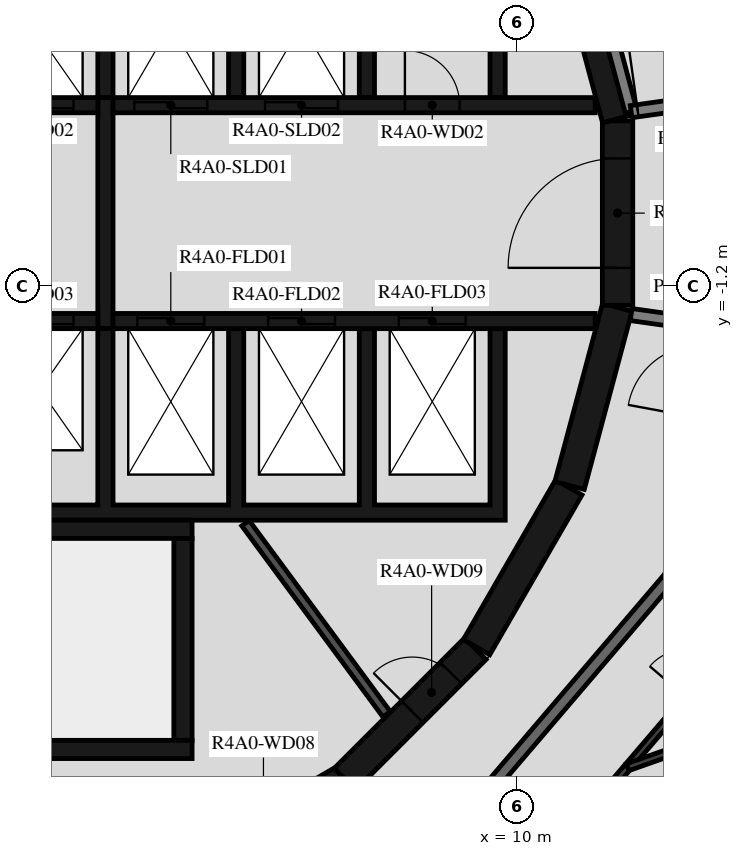
"""IFC4 building model, lengths in metres.
Left out: names, types, materials, properties, quantities, classifications, styles, units other than length and angle.
Written with IfcOpenShell. Run it as: python <this file> out.ifc"""

import sys

from ifc_helpers import new_model, si_unit, direction, frame, frame_2d, origin, place, context, subcontext, project, spatial, polyline, rectangle, outline, extrude, element, fill, save


model = new_model("IFC4")
c1 = context("Model", 3, precision=1e-05, world=origin(), true_north=direction((0.0, 1.0)))
c2 = subcontext(c1, "Body", "Model", "MODEL_VIEW")
j1 = project(units=[si_unit("LENGTHUNIT", "METRE"), si_unit("PLANEANGLEUNIT", "RADIAN")], contexts=[c1])
p1 = place(None, origin())
s1 = spatial("IfcSite", under=j1, at=p1, CompositionType="ELEMENT")
p2 = place(p1, origin())
s2 = spatial("IfcBuilding", under=s1, at=p2, CompositionType="ELEMENT")
p3 = place(p2, frame((0.0, 0.0, 151.7)))
s3 = spatial("IfcBuildingStorey", under=s2, at=p3, CompositionType="ELEMENT", Elevation=151.7)
p4 = place(p3, frame((4.51, -10.845, 0.0), z_axis=(0.0, 0.0, 1.0), x_axis=(0.865975092491, 0.500087131594, 0.0)))
e1 = element("IfcWall", 1, at=p4, inside=s3, PredefinedType="SHEAR", context=c2, shape_type="SweptSolid", body=[
    extrude(rectangle(XDim=3.033, YDim=0.5, at=frame_2d((1.516, 0.0))), origin(), (0.0, 0.0, 1.0), 3.12),
])
p5 = place(p4, frame((1.066, 0.0, 0.0)))
e2 = element("IfcOpeningElement", 2, at=p5, cuts=e1, PredefinedType="OPENING", context=c2, shape_type="SweptSolid", body=[
    extrude(rectangle(XDim=0.9, YDim=2.1, at=frame_2d((0.45, 1.05))), frame((0.0, 0.26, 0.0), z_axis=(0.0, -1.0, 0.0), x_axis=(1.0, 0.0, 0.0)), (0.0, 0.0, 1.0), 0.52),
])
p6 = place(p3, frame((7.164, -9.308, 0.0), z_axis=(0.0, 0.0, 1.0), x_axis=(0.707106781187, 0.707106781187, 0.0)))
e3 = element("IfcWall", 3, at=p6, inside=s3, PredefinedType="SHEAR", context=c2, shape_type="SweptSolid", body=[
    extrude(rectangle(XDim=3.032, YDim=0.5, at=frame_2d((1.516, 0.0))), origin(), (0.0, 0.0, 1.0), 3.12),
])
p7 = place(p6, frame((1.566, 0.0, 0.0)))
e4 = element("IfcOpeningElement", 4, at=p7, cuts=e3, PredefinedType="OPENING", context=c2, shape_type="SweptSolid", body=[
    extrude(rectangle(XDim=0.9, YDim=2.1, at=frame_2d((0.45, 1.05))), frame((0.0, 0.26, 0.0), z_axis=(0.0, -1.0, 0.0), x_axis=(1.0, 0.0, 0.0)), (0.0, 0.0, 1.0), 0.52),
])
for number, where, z_axis, x_axis in (
    (5, (9.329, -7.137, 0.0), (0.0, 0.0, 1.0), (0.5, 0.866, 0.0)),
    (6, (10.858, -4.479, 0.0), (0.0, 0.0, 1.0), (0.259, 0.966, 0.0)),
):
    element("IfcWall", number, at=place(p3, frame(where, z_axis=z_axis, x_axis=x_axis)), inside=s3, PredefinedType="SHEAR", context=c2, shape_type="SweptSolid", body=[
        extrude(rectangle(XDim=3.033, YDim=0.5, at=frame_2d((1.516, 0.0))), origin(), (0.0, 0.0, 1.0), 3.12),
    ])
p8 = place(p3, frame((11.647, -1.516, 0.0), z_axis=(0.0, 0.0, 1.0), x_axis=(0.0, 1.0, 0.0)))
e7 = element("IfcWall", 7, at=p8, inside=s3, PredefinedType="SHEAR", context=c2, shape_type="SweptSolid", body=[
    extrude(rectangle(XDim=3.033, YDim=0.5, at=frame_2d((1.516, 0.0))), origin(), (0.0, 0.0, 1.0), 3.12),
])
p9 = place(p8, frame((0.616, 0.0, 0.0)))
e8 = element("IfcOpeningElement", 8, at=p9, cuts=e7, PredefinedType="OPENING", context=c2, shape_type="SweptSolid", body=[
    extrude(rectangle(XDim=1.8, YDim=2.1, at=frame_2d((0.9, 1.05))), frame((0.0, 0.26, 0.0), z_axis=(0.0, -1.0, 0.0), x_axis=(1.0, 0.0, 0.0)), (0.0, 0.0, 1.0), 0.52),
])
p10 = place(p3, frame((11.643, 1.55, 0.0), z_axis=(0.0, 0.0, 1.0), x_axis=(-0.258734743916, 0.965948410781, 0.0)))
e9 = element("IfcWall", 9, at=p10, inside=s3, PredefinedType="SHEAR", context=c2, shape_type="SweptSolid", body=[
    extrude(rectangle(XDim=3.033, YDim=0.5, at=frame_2d((1.516, 0.0))), origin(), (0.0, 0.0, 1.0), 3.12),
])
p11 = place(p3, frame((-2.4, -5.2, 0.0), z_axis=(0.0, 0.0, 1.0), x_axis=(1.0, 0.0, 0.0)))
e10 = element("IfcWall", 10, at=p11, inside=s3, PredefinedType="SHEAR", context=c2, shape_type="SweptSolid", body=[
    extrude(rectangle(XDim=7.05, YDim=0.3, at=frame_2d((3.525, 0.0))), origin(), (0.0, 0.0, 1.0), 3.12),
])
p12 = place(p3, frame((4.5, -8.67, 0.0), z_axis=(0.0, 0.0, 1.0), x_axis=(0.0, 1.0, 0.0)))
e11 = element("IfcWall", 11, at=p12, inside=s3, PredefinedType="SHEAR", context=c2, shape_type="SweptSolid", body=[
    extrude(rectangle(XDim=3.32, YDim=0.3, at=frame_2d((1.66, 0.0))), origin(), (0.0, 0.0, 1.0), 3.12),
])
p13 = place(p3, frame((0.1, -8.82, 0.0), z_axis=(0.0, 0.0, 1.0), x_axis=(1.0, 0.0, 0.0)))
e12 = element("IfcWall", 12, at=p13, inside=s3, PredefinedType="SHEAR", context=c2, shape_type="SweptSolid", body=[
    extrude(rectangle(XDim=4.55, YDim=0.3, at=frame_2d((2.275, 0.0))), origin(), (0.0, 0.0, 1.0), 3.12),
])
p14 = place(p3, origin())
e13 = element("IfcWall", 13, at=p14, inside=s3, PredefinedType="SHEAR", context=c2, shape_type="SweptSolid", body=[
    extrude(outline(polyline([(-9.55, 4.8), (-1.2, 4.8), (-1.2, 1.9), (-0.95, 1.9), (-0.95, 4.8), (0.95, 4.8), (0.95, 1.9), (1.2, 1.9), (1.2, 4.8), (3.1, 4.8), (3.1, 1.9), (3.35, 1.9), (3.35, 4.8), (5.25, 4.8), (5.25, 1.9), (5.5, 1.9), (5.5, 4.8), (7.4, 4.8), (7.4, 1.9), (7.65, 1.9), (7.65, 4.8), (9.55, 4.8), (9.55, 1.9), (9.8, 1.9), (9.8, 4.8), (9.8, 5.05), (-9.8, 5.05), (-9.8, 4.8), (-9.8, 1.9), (-9.55, 1.9), (-9.55, 4.8)])), origin(), (0.0, 0.0, 1.0), 3.12),
])
p15 = place(p3, origin())
e14 = element("IfcWall", 14, at=p15, inside=s3, PredefinedType="SHEAR", context=c2, shape_type="SweptSolid", body=[
    extrude(outline(polyline([(9.8, -5.05), (9.8, -4.8), (9.8, -1.9), (9.55, -1.9), (9.55, -4.8), (7.65, -4.8), (7.65, -1.9), (7.4, -1.9), (7.4, -4.8), (5.5, -4.8), (5.5, -1.9), (5.25, -1.9), (5.25, -4.8), (3.35, -4.8), (3.35, -1.9), (3.1, -1.9), (3.1, -4.8), (1.2, -4.8), (1.2, -1.9), (0.95, -1.9), (0.95, -4.8), (-0.95, -4.8), (-0.95, -1.9), (-1.2, -1.9), (-1.2, -4.8), (-3.1, -4.8), (-3.1, -1.9), (-3.35, -1.9), (-3.35, -4.8), (-5.25, -4.8), (-5.25, -1.9), (-5.5, -1.9), (-5.5, -4.8), (-7.4, -4.8), (-7.4, -1.9), (-7.65, -1.9), (-7.65, -4.8), (-9.55, -4.8), (-9.55, -1.9), (-9.8, -1.9), (-9.8, -4.8), (-9.8, -5.05), (9.8, -5.05)])), origin(), (0.0, 0.0, 1.0), 3.12),
])
p16 = place(p3, frame((-11.28, 1.775, 0.0), z_axis=(0.0, 0.0, 1.0), x_axis=(1.0, 0.0, 0.0)))
e15 = element("IfcWall", 15, at=p16, inside=s3, PredefinedType="SHEAR", context=c2, shape_type="SweptSolid", body=[
    extrude(rectangle(XDim=14.38, YDim=0.25, at=frame_2d((7.19, 0.0))), origin(), (0.0, 0.0, 1.0), 3.12),
])
p17 = place(p16, frame((10.73, 0.0, 0.0)))
e16 = element("IfcOpeningElement", 16, at=p17, cuts=e15, PredefinedType="OPENING", context=c2, shape_type="SweptSolid", body=[
    extrude(rectangle(XDim=1.1, YDim=2.1, at=frame_2d((0.55, 1.05))), frame((0.0, 0.135, 0.0), z_axis=(0.0, -1.0, 0.0), x_axis=(1.0, 0.0, 0.0)), (0.0, 0.0, 1.0), 0.27),
])
p18 = place(p16, frame((12.88, 0.0, 0.0)))
e17 = element("IfcOpeningElement", 17, at=p18, cuts=e15, PredefinedType="OPENING", context=c2, shape_type="SweptSolid", body=[
    extrude(rectangle(XDim=1.1, YDim=2.1, at=frame_2d((0.55, 1.05))), frame((0.0, 0.135, 0.0), z_axis=(0.0, -1.0, 0.0), x_axis=(1.0, 0.0, 0.0)), (0.0, 0.0, 1.0), 0.27),
])
p19 = place(p16, frame((5.455, 0.0, 0.0)))
e18 = element("IfcOpeningElement", 18, at=p19, cuts=e15, PredefinedType="OPENING", context=c2, shape_type="SweptSolid", body=[
    extrude(rectangle(XDim=0.9, YDim=2.1, at=frame_2d((0.45, 1.05))), frame((0.0, 0.135, 0.0), z_axis=(0.0, -1.0, 0.0), x_axis=(1.0, 0.0, 0.0)), (0.0, 0.0, 1.0), 0.27),
])
p20 = place(p3, frame((3.35, 1.775, 0.0), z_axis=(0.0, 0.0, 1.0), x_axis=(1.0, 0.0, 0.0)))
e19 = element("IfcWall", 19, at=p20, inside=s3, PredefinedType="SHEAR", context=c2, shape_type="SweptSolid", body=[
    extrude(rectangle(XDim=7.93, YDim=0.25, at=frame_2d((3.965, 0.0))), origin(), (0.0, 0.0, 1.0), 3.12),
])
p21 = place(p20, frame((0.35, 0.0, 0.0)))
e20 = element("IfcOpeningElement", 20, at=p21, cuts=e19, PredefinedType="OPENING", context=c2, shape_type="SweptSolid", body=[
    extrude(rectangle(XDim=1.2, YDim=2.4, at=frame_2d((0.6, 1.2))), frame((0.0, 0.135, 0.0), z_axis=(0.0, -1.0, 0.0), x_axis=(1.0, 0.0, 0.0)), (0.0, 0.0, 1.0), 0.27),
])
p22 = place(p20, frame((2.5, 0.0, 0.0)))
e21 = element("IfcOpeningElement", 21, at=p22, cuts=e19, PredefinedType="OPENING", context=c2, shape_type="SweptSolid", body=[
    extrude(rectangle(XDim=1.2, YDim=2.4, at=frame_2d((0.6, 1.2))), frame((0.0, 0.135, 0.0), z_axis=(0.0, -1.0, 0.0), x_axis=(1.0, 0.0, 0.0)), (0.0, 0.0, 1.0), 0.27),
])
p23 = place(p20, frame((4.8, 0.0, 0.0)))
e22 = element("IfcOpeningElement", 22, at=p23, cuts=e19, PredefinedType="OPENING", context=c2, shape_type="SweptSolid", body=[
    extrude(rectangle(XDim=0.9, YDim=2.1, at=frame_2d((0.45, 1.05))), frame((0.0, 0.135, 0.0), z_axis=(0.0, -1.0, 0.0), x_axis=(1.0, 0.0, 0.0)), (0.0, 0.0, 1.0), 0.27),
])
p24 = place(p3, frame((-11.28, -1.775, 0.0), z_axis=(0.0, 0.0, 1.0), x_axis=(1.0, 0.0, 0.0)))
e23 = element("IfcWall", 23, at=p24, inside=s3, PredefinedType="SHEAR", context=c2, shape_type="SweptSolid", body=[
    extrude(rectangle(XDim=14.38, YDim=0.25, at=frame_2d((7.19, 0.0))), origin(), (0.0, 0.0, 1.0), 3.12),
])
p25 = place(p24, frame((2.03, 0.0, 0.0)))
e24 = element("IfcOpeningElement", 24, at=p25, cuts=e23, PredefinedType="OPENING", context=c2, shape_type="SweptSolid", body=[
    extrude(rectangle(XDim=1.3, YDim=2.1, at=frame_2d((0.65, 1.05))), frame((0.0, 0.135, 0.0), z_axis=(0.0, -1.0, 0.0), x_axis=(1.0, 0.0, 0.0)), (0.0, 0.0, 1.0), 0.27),
])
p26 = place(p24, frame((4.18, 0.0, 0.0)))
e25 = element("IfcOpeningElement", 25, at=p26, cuts=e23, PredefinedType="OPENING", context=c2, shape_type="SweptSolid", body=[
    extrude(rectangle(XDim=1.3, YDim=2.1, at=frame_2d((0.65, 1.05))), frame((0.0, 0.135, 0.0), z_axis=(0.0, -1.0, 0.0), x_axis=(1.0, 0.0, 0.0)), (0.0, 0.0, 1.0), 0.27),
])
p27 = place(p24, frame((12.88, 0.0, 0.0)))
e26 = element("IfcOpeningElement", 26, at=p27, cuts=e23, PredefinedType="OPENING", context=c2, shape_type="SweptSolid", body=[
    extrude(rectangle(XDim=1.1, YDim=2.1, at=frame_2d((0.55, 1.05))), frame((0.0, 0.135, 0.0), z_axis=(0.0, -1.0, 0.0), x_axis=(1.0, 0.0, 0.0)), (0.0, 0.0, 1.0), 0.27),
])
p28 = place(p24, frame((6.53, 0.0, 0.0)))
e27 = element("IfcOpeningElement", 27, at=p28, cuts=e23, PredefinedType="OPENING", context=c2, shape_type="SweptSolid", body=[
    extrude(rectangle(XDim=0.9, YDim=2.1, at=frame_2d((0.45, 1.05))), frame((0.0, 0.135, 0.0), z_axis=(0.0, -1.0, 0.0), x_axis=(1.0, 0.0, 0.0)), (0.0, 0.0, 1.0), 0.27),
])
p29 = place(p24, frame((8.68, 0.0, 0.0)))
e28 = element("IfcOpeningElement", 28, at=p29, cuts=e23, PredefinedType="OPENING", context=c2, shape_type="SweptSolid", body=[
    extrude(rectangle(XDim=0.9, YDim=2.1, at=frame_2d((0.45, 1.05))), frame((0.0, 0.135, 0.0), z_axis=(0.0, -1.0, 0.0), x_axis=(1.0, 0.0, 0.0)), (0.0, 0.0, 1.0), 0.27),
])
p30 = place(p24, frame((10.83, 0.0, 0.0)))
e29 = element("IfcOpeningElement", 29, at=p30, cuts=e23, PredefinedType="OPENING", context=c2, shape_type="SweptSolid", body=[
    extrude(rectangle(XDim=0.9, YDim=2.1, at=frame_2d((0.45, 1.05))), frame((0.0, 0.135, 0.0), z_axis=(0.0, -1.0, 0.0), x_axis=(1.0, 0.0, 0.0)), (0.0, 0.0, 1.0), 0.27),
])
p31 = place(p3, frame((3.35, -1.775, 0.0), z_axis=(0.0, 0.0, 1.0), x_axis=(1.0, 0.0, 0.0)))
e30 = element("IfcWall", 30, at=p31, inside=s3, PredefinedType="SHEAR", context=c2, shape_type="SweptSolid", body=[
    extrude(rectangle(XDim=7.93, YDim=0.25, at=frame_2d((3.965, 0.0))), origin(), (0.0, 0.0, 1.0), 3.12),
])
p32 = place(p31, frame((0.4, 0.0, 0.0)))
e31 = element("IfcOpeningElement", 31, at=p32, cuts=e30, PredefinedType="OPENING", context=c2, shape_type="SweptSolid", body=[
    extrude(rectangle(XDim=1.1, YDim=2.4, at=frame_2d((0.55, 1.2))), frame((0.0, 0.135, 0.0), z_axis=(0.0, -1.0, 0.0), x_axis=(1.0, 0.0, 0.0)), (0.0, 0.0, 1.0), 0.27),
])
p33 = place(p31, frame((2.55, 0.0, 0.0)))
e32 = element("IfcOpeningElement", 32, at=p33, cuts=e30, PredefinedType="OPENING", context=c2, shape_type="SweptSolid", body=[
    extrude(rectangle(XDim=1.1, YDim=2.4, at=frame_2d((0.55, 1.2))), frame((0.0, 0.135, 0.0), z_axis=(0.0, -1.0, 0.0), x_axis=(1.0, 0.0, 0.0)), (0.0, 0.0, 1.0), 0.27),
])
p34 = place(p31, frame((4.7, 0.0, 0.0)))
e33 = element("IfcOpeningElement", 33, at=p34, cuts=e30, PredefinedType="OPENING", context=c2, shape_type="SweptSolid", body=[
    extrude(rectangle(XDim=1.1, YDim=2.4, at=frame_2d((0.55, 1.2))), frame((0.0, 0.135, 0.0), z_axis=(0.0, -1.0, 0.0), x_axis=(1.0, 0.0, 0.0)), (0.0, 0.0, 1.0), 0.27),
])
p35 = place(p3, frame((3.225, -1.9, 0.0), z_axis=(0.0, 0.0, 1.0), x_axis=(0.0, 1.0, 0.0)))
e34 = element("IfcWall", 34, at=p35, inside=s3, PredefinedType="SHEAR", context=c2, shape_type="SweptSolid", body=[
    extrude(rectangle(XDim=3.8, YDim=0.25, at=frame_2d((1.9, 0.0))), origin(), (0.0, 0.0, 1.0), 3.12),
])
p36 = place(p3, frame((5.528, -5.098, 0.0), z_axis=(0.0, 0.0, 1.0), x_axis=(0.594034318069, -0.804439698769, 0.0)))
e35 = element("IfcWall", 35, at=p36, inside=s3, PredefinedType="PARTITIONING", context=c2, shape_type="SweptSolid", body=[
    extrude(rectangle(XDim=3.907, YDim=0.15, at=frame_2d((1.953, 0.0))), origin(), (0.0, 0.0, 1.0), 3.12),
])
p37 = place(p3, frame((11.87, 1.668, 0.0), z_axis=(0.0, 0.0, 1.0), x_axis=(-0.258836880648, 0.965921047093, 0.0)))
e36 = element("IfcWall", 36, at=p37, inside=s3, PredefinedType="STANDARD", context=c2, shape_type="SweptSolid", body=[
    extrude(rectangle(XDim=1.695, YDim=0.2, at=frame_2d((0.848, 0.0))), origin(), (0.0, 0.0, 1.0), 3.12),
])
p38 = place(p3, frame((11.87, 1.668, 0.0), z_axis=(0.0, 0.0, 1.0), x_axis=(0.990270910415, 0.139152879904, 0.0)))
e37 = element("IfcWall", 37, at=p38, inside=s3, PredefinedType="STANDARD", context=c2, shape_type="SweptSolid", body=[
    extrude(rectangle(XDim=1.688, YDim=0.2, at=frame_2d((0.844, 0.0))), origin(), (0.0, 0.0, 1.0), 3.12),
])
p39 = place(p38, frame((0.11, 0.0, 0.0)))
e38 = element("IfcOpeningElement", 38, at=p39, cuts=e37, PredefinedType="OPENING", context=c2, shape_type="SweptSolid", body=[
    extrude(rectangle(XDim=1.2, YDim=2.1, at=frame_2d((0.6, 1.05))), frame((0.0, 0.11, 0.0), z_axis=(0.0, -1.0, 0.0), x_axis=(1.0, 0.0, 0.0)), (0.0, 0.0, 1.0), 0.22),
])
p40 = place(p3, frame((13.542, 1.903, 0.0), z_axis=(0.0, 0.0, 1.0), x_axis=(-0.333808508206, 0.942640907159, 0.0)))
e39 = element("IfcWall", 39, at=p40, inside=s3, PredefinedType="STANDARD", context=c2, shape_type="SweptSolid", body=[
    extrude(rectangle(XDim=6.317, YDim=0.2, at=frame_2d((3.158, 0.0))), origin(), (0.0, 0.0, 1.0), 3.12),
])
p41 = place(p3, frame((13.282, -1.867, 0.0), z_axis=(0.0, 0.0, 1.0), x_axis=(-0.990265430288, 0.139191873241, 0.0)))
e40 = element("IfcWall", 40, at=p41, inside=s3, PredefinedType="STANDARD", context=c2, shape_type="SweptSolid", body=[
    extrude(rectangle(XDim=1.426, YDim=0.2, at=frame_2d((0.713, 0.0))), origin(), (0.0, 0.0, 1.0), 3.12),
])
p42 = place(p3, frame((7.858, -11.433, 0.0), z_axis=(0.0, 0.0, 1.0), x_axis=(0.649440801937, 0.760412154545, 0.0)))
e41 = element("IfcWall", 41, at=p42, inside=s3, PredefinedType="STANDARD", context=c2, shape_type="SweptSolid", body=[
    extrude(rectangle(XDim=7.181, YDim=0.2, at=frame_2d((3.59, 0.0))), origin(), (0.0, 0.0, 1.0), 3.12),
])
p43 = place(p3, frame((8.737, -12.713, 0.0), z_axis=(0.0, 0.0, 1.0), x_axis=(0.649430604754, 0.760420863476, 0.0)))
e42 = element("IfcWall", 42, at=p43, inside=s3, PredefinedType="PARTITIONING", context=c2, shape_type="SweptSolid", body=[
    extrude(rectangle(XDim=7.985, YDim=0.12, at=frame_2d((3.992, 0.0))), origin(), (0.0, 0.0, 1.0), 3.12),
])
p44 = place(p43, frame((0.2, 0.0, 0.0)))
e43 = element("IfcOpeningElement", 43, at=p44, cuts=e42, PredefinedType="OPENING", context=c2, shape_type="SweptSolid", body=[
    extrude(rectangle(XDim=0.9, YDim=2.1, at=frame_2d((0.45, 1.05))), frame((0.0, 0.07, 0.0), z_axis=(0.0, -1.0, 0.0), x_axis=(1.0, 0.0, 0.0)), (0.0, 0.0, 1.0), 0.14),
])
p45 = place(p43, frame((6.234, 0.0, 0.0)))
e44 = element("IfcOpeningElement", 44, at=p45, cuts=e42, PredefinedType="OPENING", context=c2, shape_type="SweptSolid", body=[
    extrude(rectangle(XDim=0.8, YDim=2.1, at=frame_2d((0.4, 1.05))), frame((0.0, 0.07, 0.0), z_axis=(0.0, -1.0, 0.0), x_axis=(1.0, 0.0, 0.0)), (0.0, 0.0, 1.0), 0.14),
])
p46 = place(p3, frame((17.198, -7.206, 0.0), z_axis=(0.0, 0.0, 1.0), x_axis=(-0.942639551003, -0.333812337826, 0.0)))
e45 = element("IfcWall", 45, at=p46, inside=s3, PredefinedType="PARTITIONING", context=c2, shape_type="SweptSolid", body=[
    extrude(rectangle(XDim=5.713, YDim=0.12, at=frame_2d((2.857, 0.0))), origin(), (0.0, 0.0, 1.0), 3.12),
])
p47 = place(p9, origin())
e46 = element("IfcDoor", 46, at=p47, inside=s3, OperationType="DOUBLE_DOOR_SINGLE_SWING", PredefinedType="DOOR", context=c2, shape_type="SweptSolid", body=[
    extrude(rectangle(XDim=1.8, YDim=2.1, at=frame_2d((0.9, 1.05))), frame((0.0, 0.025, 0.0), z_axis=(0.0, -1.0, 0.0), x_axis=(1.0, 0.0, 0.0)), (0.0, 0.0, 1.0), 0.05),
])
fill(e8, e46)
p48 = place(p18, origin())
e47 = element("IfcDoor", 47, at=p48, inside=s3, OperationType="DOUBLE_DOOR_SLIDING", PredefinedType="DOOR", context=c2, shape_type="SweptSolid", body=[
    extrude(rectangle(XDim=1.1, YDim=2.1, at=frame_2d((0.55, 1.05))), frame((0.0, 0.025, 0.0), z_axis=(0.0, -1.0, 0.0), x_axis=(1.0, 0.0, 0.0)), (0.0, 0.0, 1.0), 0.05),
])
fill(e17, e47)
p49 = place(p21, origin())
e48 = element("IfcDoor", 48, at=p49, inside=s3, OperationType="DOUBLE_DOOR_SLIDING", PredefinedType="DOOR", context=c2, shape_type="SweptSolid", body=[
    extrude(rectangle(XDim=1.2, YDim=2.4, at=frame_2d((0.6, 1.2))), frame((0.0, 0.025, 0.0), z_axis=(0.0, -1.0, 0.0), x_axis=(1.0, 0.0, 0.0)), (0.0, 0.0, 1.0), 0.05),
])
fill(e20, e48)
p50 = place(p22, origin())
e49 = element("IfcDoor", 49, at=p50, inside=s3, OperationType="DOUBLE_DOOR_SLIDING", PredefinedType="DOOR", context=c2, shape_type="SweptSolid", body=[
    extrude(rectangle(XDim=1.2, YDim=2.4, at=frame_2d((0.6, 1.2))), frame((0.0, 0.025, 0.0), z_axis=(0.0, -1.0, 0.0), x_axis=(1.0, 0.0, 0.0)), (0.0, 0.0, 1.0), 0.05),
])
fill(e21, e49)
p51 = place(p27, origin())
e50 = element("IfcDoor", 50, at=p51, inside=s3, OperationType="DOUBLE_DOOR_SLIDING", PredefinedType="DOOR", context=c2, shape_type="SweptSolid", body=[
    extrude(rectangle(XDim=1.1, YDim=2.1, at=frame_2d((0.55, 1.05))), frame((0.0, 0.025, 0.0), z_axis=(0.0, -1.0, 0.0), x_axis=(1.0, 0.0, 0.0)), (0.0, 0.0, 1.0), 0.05),
])
fill(e26, e50)
p52 = place(p32, origin())
e51 = element("IfcDoor", 51, at=p52, inside=s3, OperationType="DOUBLE_DOOR_SLIDING", PredefinedType="DOOR", context=c2, shape_type="SweptSolid", body=[
    extrude(rectangle(XDim=1.1, YDim=2.4, at=frame_2d((0.55, 1.2))), frame((0.0, 0.025, 0.0), z_axis=(0.0, -1.0, 0.0), x_axis=(1.0, 0.0, 0.0)), (0.0, 0.0, 1.0), 0.05),
])
fill(e31, e51)
p53 = place(p33, origin())
e52 = element("IfcDoor", 52, at=p53, inside=s3, OperationType="DOUBLE_DOOR_SLIDING", PredefinedType="DOOR", context=c2, shape_type="SweptSolid", body=[
    extrude(rectangle(XDim=1.1, YDim=2.4, at=frame_2d((0.55, 1.2))), frame((0.0, 0.025, 0.0), z_axis=(0.0, -1.0, 0.0), x_axis=(1.0, 0.0, 0.0)), (0.0, 0.0, 1.0), 0.05),
])
fill(e32, e52)
p54 = place(p34, origin())
e53 = element("IfcDoor", 53, at=p54, inside=s3, OperationType="DOUBLE_DOOR_SLIDING", PredefinedType="DOOR", context=c2, shape_type="SweptSolid", body=[
    extrude(rectangle(XDim=1.1, YDim=2.4, at=frame_2d((0.55, 1.2))), frame((0.0, 0.025, 0.0), z_axis=(0.0, -1.0, 0.0), x_axis=(1.0, 0.0, 0.0)), (0.0, 0.0, 1.0), 0.05),
])
fill(e33, e53)
p55 = place(p23, origin())
e54 = element("IfcDoor", 54, at=p55, inside=s3, OperationType="SINGLE_SWING_RIGHT", PredefinedType="DOOR", context=c2, shape_type="SweptSolid", body=[
    extrude(rectangle(XDim=0.9, YDim=2.1, at=frame_2d((0.45, 1.05))), frame((0.0, 0.025, 0.0), z_axis=(0.0, -1.0, 0.0), x_axis=(1.0, 0.0, 0.0)), (0.0, 0.0, 1.0), 0.05),
])
fill(e22, e54)
p56 = place(p7, origin())
e55 = element("IfcDoor", 55, at=p56, inside=s3, OperationType="SINGLE_SWING_LEFT", PredefinedType="DOOR", context=c2, shape_type="SweptSolid", body=[
    extrude(rectangle(XDim=0.9, YDim=2.1, at=frame_2d((0.45, 1.05))), frame((0.0, 0.025, 0.0), z_axis=(0.0, -1.0, 0.0), x_axis=(1.0, 0.0, 0.0)), (0.0, 0.0, 1.0), 0.05),
])
fill(e4, e55)
p57 = place(p39, origin())
e56 = element("IfcDoor", 56, at=p57, inside=s3, OperationType="DOUBLE_DOOR_SINGLE_SWING", PredefinedType="DOOR", context=c2, shape_type="SweptSolid", body=[
    extrude(rectangle(XDim=1.2, YDim=2.1, at=frame_2d((0.6, 1.05))), frame((0.0, 0.025, 0.0), z_axis=(0.0, -1.0, 0.0), x_axis=(1.0, 0.0, 0.0)), (0.0, 0.0, 1.0), 0.05),
])
fill(e38, e56)
save(model, sys.argv[1])
